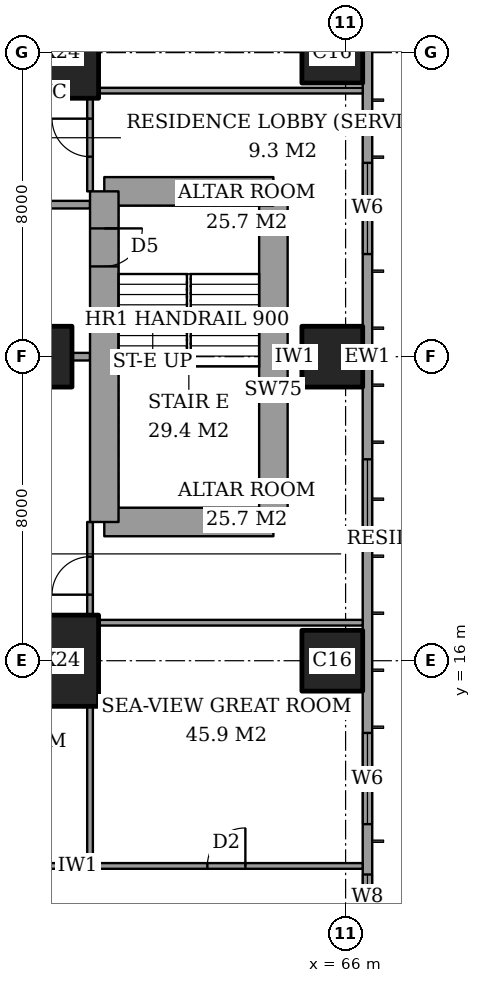
"""IFC4 building model, lengths in metres.
Left out: names, types, materials, properties, quantities, classifications, styles, units other than length and angle.
Written with IfcOpenShell. Run it as: python <this file> out.ifc"""

import sys

from ifc_helpers import new_model, si_unit, direction, frame, frame_2d, origin, origin_2d, place, context, subcontext, project, spatial, rectangle, extrude, element, fill, save


model = new_model("IFC4")
c1 = context("Model", 3, precision=1e-05, world=origin(), true_north=direction((0.0, 1.0)))
c2 = subcontext(c1, "Body", "Model", "MODEL_VIEW")
j1 = project(units=[si_unit("LENGTHUNIT", "METRE"), si_unit("PLANEANGLEUNIT", "RADIAN")], contexts=[c1])
p1 = place(None, origin())
s1 = spatial("IfcSite", under=j1, at=p1, CompositionType="ELEMENT")
p2 = place(p1, origin())
s2 = spatial("IfcBuilding", under=s1, at=p2, CompositionType="ELEMENT")
p3 = place(p2, frame((0.0, 0.0, 241.2)))
s3 = spatial("IfcBuildingStorey", under=s2, at=p3, CompositionType="ELEMENT", Elevation=241.2)
p4 = place(p3, frame((58.0, 16.0, 0.0), z_axis=(0.0, 0.0, 1.0), x_axis=(1.0, 0.0, 0.0)))
e1 = element("IfcColumn", 1, at=p4, inside=s3, PredefinedType="COLUMN", context=c2, shape_type="SweptSolid", body=[
    extrude(rectangle(XDim=3.0, YDim=2.4, at=origin_2d()), origin(), (0.0, 0.0, 1.0), 3.6),
])
p5 = place(p3, frame((58.0, 24.0, 0.0), z_axis=(0.0, 0.0, 1.0), x_axis=(1.0, 0.0, 0.0)))
e2 = element("IfcColumn", 2, at=p5, inside=s3, PredefinedType="COLUMN", context=c2, shape_type="SweptSolid", body=[
    extrude(rectangle(XDim=1.6, YDim=1.6, at=origin_2d()), origin(), (0.0, 0.0, 1.0), 3.6),
])
p6 = place(p3, frame((58.0, 32.0, 0.0), z_axis=(0.0, 0.0, 1.0), x_axis=(1.0, 0.0, 0.0)))
e3 = element("IfcColumn", 3, at=p6, inside=s3, PredefinedType="COLUMN", context=c2, shape_type="SweptSolid", body=[
    extrude(rectangle(XDim=3.0, YDim=2.4, at=origin_2d()), origin(), (0.0, 0.0, 1.0), 3.6),
])
for number, where, z_axis, x_axis in (
    (4, (65.65, 16.0, 0.0), (0.0, 0.0, 1.0), (1.0, 0.0, 0.0)),
    (5, (65.65, 24.0, 0.0), (0.0, 0.0, 1.0), (1.0, 0.0, 0.0)),
    (6, (65.65, 32.0, 0.0), (0.0, 0.0, 1.0), (1.0, 0.0, 0.0)),
):
    element("IfcColumn", number, at=place(p3, frame(where, z_axis=z_axis, x_axis=x_axis)), inside=s3, PredefinedType="COLUMN", context=c2, shape_type="SweptSolid", body=[
        extrude(rectangle(XDim=1.6, YDim=1.6, at=origin_2d()), origin(), (0.0, 0.0, 1.0), 3.6),
    ])
p7 = place(p3, frame((59.65, 19.65, 0.0), z_axis=(0.0, 0.0, 1.0), x_axis=(1.0, 0.0, 0.0)))
e7 = element("IfcWall", 7, at=p7, inside=s3, PredefinedType="SHEAR", context=c2, shape_type="SweptSolid", body=[
    extrude(rectangle(XDim=4.45, YDim=0.75, at=frame_2d((2.225, 0.0))), origin(), (0.0, 0.0, 1.0), 3.6),
])
p8 = place(p3, frame((64.1, 19.65, 0.0), z_axis=(0.0, 0.0, 1.0), x_axis=(0.0, 1.0, 0.0)))
e8 = element("IfcWall", 8, at=p8, inside=s3, PredefinedType="SHEAR", context=c2, shape_type="SweptSolid", body=[
    extrude(rectangle(XDim=8.7, YDim=0.75, at=frame_2d((4.35, 0.0))), origin(), (0.0, 0.0, 1.0), 3.6),
])
p9 = place(p3, frame((64.1, 28.35, 0.0), z_axis=(0.0, 0.0, 1.0), x_axis=(-1.0, 0.0, 0.0)))
e9 = element("IfcWall", 9, at=p9, inside=s3, PredefinedType="SHEAR", context=c2, shape_type="SweptSolid", body=[
    extrude(rectangle(XDim=4.45, YDim=0.75, at=frame_2d((2.225, 0.0))), origin(), (0.0, 0.0, 1.0), 3.6),
])
p10 = place(p3, frame((59.65, 28.35, 0.0), z_axis=(0.0, 0.0, 1.0), x_axis=(0.0, -1.0, 0.0)))
e10 = element("IfcWall", 10, at=p10, inside=s3, PredefinedType="SHEAR", context=c2, shape_type="SweptSolid", body=[
    extrude(rectangle(XDim=8.7, YDim=0.75, at=frame_2d((4.35, 0.0))), origin(), (0.0, 0.0, 1.0), 3.6),
])
p11 = place(p10, frame((0.975, 0.0, 0.0)))
e11 = element("IfcOpeningElement", 11, at=p11, cuts=e10, PredefinedType="OPENING", context=c2, shape_type="SweptSolid", body=[
    extrude(rectangle(XDim=1.0, YDim=2.1, at=frame_2d((0.5, 1.05))), frame((0.0, 0.385, 0.0), z_axis=(0.0, -1.0, 0.0), x_axis=(1.0, 0.0, 0.0)), (0.0, 0.0, 1.0), 0.77),
])
p12 = place(p3, frame((66.575, 3.175, 0.0), z_axis=(0.0, 0.0, 1.0), x_axis=(0.0, 1.0, 0.0)))
e12 = element("IfcWall", 12, at=p12, inside=s3, PredefinedType="SOLIDWALL", context=c2, shape_type="SweptSolid", body=[
    extrude(rectangle(XDim=41.65, YDim=0.25, at=frame_2d((20.825, 0.0))), origin(), (0.0, 0.0, 1.0), 3.6),
])
p13 = place(p12, frame((0.875, 0.0, 0.6)))
e13 = element("IfcOpeningElement", 13, at=p13, cuts=e12, PredefinedType="OPENING", context=c2, shape_type="SweptSolid", body=[
    extrude(rectangle(XDim=2.4, YDim=2.0, at=frame_2d((1.2, 1.0))), frame((0.0, 0.135, 0.0), z_axis=(0.0, -1.0, 0.0), x_axis=(1.0, 0.0, 0.0)), (0.0, 0.0, 1.0), 0.27),
])
p14 = place(p12, frame((6.0, 0.0, 0.6)))
e14 = element("IfcOpeningElement", 14, at=p14, cuts=e12, PredefinedType="OPENING", context=c2, shape_type="SweptSolid", body=[
    extrude(rectangle(XDim=1.2, YDim=2.0, at=frame_2d((0.6, 1.0))), frame((0.0, 0.135, 0.0), z_axis=(0.0, -1.0, 0.0), x_axis=(1.0, 0.0, 0.0)), (0.0, 0.0, 1.0), 0.27),
])
p15 = place(p12, frame((8.525, 0.0, 0.6)))
e15 = element("IfcOpeningElement", 15, at=p15, cuts=e12, PredefinedType="OPENING", context=c2, shape_type="SweptSolid", body=[
    extrude(rectangle(XDim=2.4, YDim=2.0, at=frame_2d((1.2, 1.0))), frame((0.0, 0.135, 0.0), z_axis=(0.0, -1.0, 0.0), x_axis=(1.0, 0.0, 0.0)), (0.0, 0.0, 1.0), 0.27),
])
p16 = place(p12, frame((15.725, 0.0, 0.6)))
e16 = element("IfcOpeningElement", 16, at=p16, cuts=e12, PredefinedType="OPENING", context=c2, shape_type="SweptSolid", body=[
    extrude(rectangle(XDim=2.4, YDim=2.0, at=frame_2d((1.2, 1.0))), frame((0.0, 0.135, 0.0), z_axis=(0.0, -1.0, 0.0), x_axis=(1.0, 0.0, 0.0)), (0.0, 0.0, 1.0), 0.27),
])
p17 = place(p12, frame((23.525, 0.0, 0.6)))
e17 = element("IfcOpeningElement", 17, at=p17, cuts=e12, PredefinedType="OPENING", context=c2, shape_type="SweptSolid", body=[
    extrude(rectangle(XDim=2.4, YDim=2.0, at=frame_2d((1.2, 1.0))), frame((0.0, 0.135, 0.0), z_axis=(0.0, -1.0, 0.0), x_axis=(1.0, 0.0, 0.0)), (0.0, 0.0, 1.0), 0.27),
])
p18 = place(p12, frame((30.625, 0.0, 0.6)))
e18 = element("IfcOpeningElement", 18, at=p18, cuts=e12, PredefinedType="OPENING", context=c2, shape_type="SweptSolid", body=[
    extrude(rectangle(XDim=2.4, YDim=2.0, at=frame_2d((1.2, 1.0))), frame((0.0, 0.135, 0.0), z_axis=(0.0, -1.0, 0.0), x_axis=(1.0, 0.0, 0.0)), (0.0, 0.0, 1.0), 0.27),
])
p19 = place(p12, frame((34.325, 0.0, 0.6)))
e19 = element("IfcOpeningElement", 19, at=p19, cuts=e12, PredefinedType="OPENING", context=c2, shape_type="SweptSolid", body=[
    extrude(rectangle(XDim=1.2, YDim=2.0, at=frame_2d((0.6, 1.0))), frame((0.0, 0.135, 0.0), z_axis=(0.0, -1.0, 0.0), x_axis=(1.0, 0.0, 0.0)), (0.0, 0.0, 1.0), 0.27),
])
p20 = place(p12, frame((38.375, 0.0, 0.6)))
e20 = element("IfcOpeningElement", 20, at=p20, cuts=e12, PredefinedType="OPENING", context=c2, shape_type="SweptSolid", body=[
    extrude(rectangle(XDim=2.4, YDim=2.0, at=frame_2d((1.2, 1.0))), frame((0.0, 0.135, 0.0), z_axis=(0.0, -1.0, 0.0), x_axis=(1.0, 0.0, 0.0)), (0.0, 0.0, 1.0), 0.27),
])
p21 = place(p3, frame((41.439, 10.6, 0.0), z_axis=(0.0, 0.0, 1.0), x_axis=(1.0, 0.0, 0.0)))
e21 = element("IfcWall", 21, at=p21, inside=s3, PredefinedType="PARTITIONING", context=c2, shape_type="SweptSolid", body=[
    extrude(rectangle(XDim=25.011, YDim=0.15, at=frame_2d((12.505, 0.0))), origin(), (0.0, 0.0, 1.0), 3.35),
])
p22 = place(p21, frame((11.961, 0.0, 0.0)))
e22 = element("IfcOpeningElement", 22, at=p22, cuts=e21, PredefinedType="OPENING", context=c2, shape_type="SweptSolid", body=[
    extrude(rectangle(XDim=1.0, YDim=2.1, at=frame_2d((0.5, 1.05))), frame((0.0, 0.085, 0.0), z_axis=(0.0, -1.0, 0.0), x_axis=(1.0, 0.0, 0.0)), (0.0, 0.0, 1.0), 0.17),
])
p23 = place(p21, frame((20.924, 0.0, 0.0)))
e23 = element("IfcOpeningElement", 23, at=p23, cuts=e21, PredefinedType="OPENING", context=c2, shape_type="SweptSolid", body=[
    extrude(rectangle(XDim=1.0, YDim=2.1, at=frame_2d((0.5, 1.05))), frame((0.0, 0.085, 0.0), z_axis=(0.0, -1.0, 0.0), x_axis=(1.0, 0.0, 0.0)), (0.0, 0.0, 1.0), 0.17),
])
p24 = place(p21, frame((15.249, 0.0, 0.0)))
e24 = element("IfcOpeningElement", 24, at=p24, cuts=e21, PredefinedType="OPENING", context=c2, shape_type="SweptSolid", body=[
    extrude(rectangle(XDim=0.9, YDim=2.1, at=frame_2d((0.45, 1.05))), frame((0.0, 0.085, 0.0), z_axis=(0.0, -1.0, 0.0), x_axis=(1.0, 0.0, 0.0)), (0.0, 0.0, 1.0), 0.17),
])
p25 = place(p21, frame((9.661, 0.0, 0.0)))
e25 = element("IfcOpeningElement", 25, at=p25, cuts=e21, PredefinedType="OPENING", context=c2, shape_type="SweptSolid", body=[
    extrude(rectangle(XDim=1.0, YDim=2.1, at=frame_2d((0.5, 1.05))), frame((0.0, 0.085, 0.0), z_axis=(0.0, -1.0, 0.0), x_axis=(1.0, 0.0, 0.0)), (0.0, 0.0, 1.0), 0.17),
])
p26 = place(p21, frame((7.311, 0.0, 0.0)))
e26 = element("IfcOpeningElement", 26, at=p26, cuts=e21, PredefinedType="OPENING", context=c2, shape_type="SweptSolid", body=[
    extrude(rectangle(XDim=0.9, YDim=2.1, at=frame_2d((0.45, 1.05))), frame((0.0, 0.085, 0.0), z_axis=(0.0, -1.0, 0.0), x_axis=(1.0, 0.0, 0.0)), (0.0, 0.0, 1.0), 0.17),
])
p27 = place(p21, frame((2.836, 0.0, 0.0)))
e27 = element("IfcOpeningElement", 27, at=p27, cuts=e21, PredefinedType="OPENING", context=c2, shape_type="SweptSolid", body=[
    extrude(rectangle(XDim=1.0, YDim=2.1, at=frame_2d((0.5, 1.05))), frame((0.0, 0.085, 0.0), z_axis=(0.0, -1.0, 0.0), x_axis=(1.0, 0.0, 0.0)), (0.0, 0.0, 1.0), 0.17),
])
p28 = place(p3, frame((59.5, 17.0, 0.0), z_axis=(0.0, 0.0, 1.0), x_axis=(1.0, 0.0, 0.0)))
e28 = element("IfcWall", 28, at=p28, inside=s3, PredefinedType="PARTITIONING", context=c2, shape_type="SweptSolid", body=[
    extrude(rectangle(XDim=6.95, YDim=0.15, at=frame_2d((3.475, 0.0))), origin(), (0.0, 0.0, 1.0), 3.35),
])
p29 = place(p3, frame((58.8, 24.0, 0.0), z_axis=(0.0, 0.0, 1.0), x_axis=(1.0, 0.0, 0.0)))
e29 = element("IfcWall", 29, at=p29, inside=s3, PredefinedType="PARTITIONING", context=c2, shape_type="SweptSolid", body=[
    extrude(rectangle(XDim=0.475, YDim=0.2, at=frame_2d((0.237, 0.0))), origin(), (0.0, 0.0, 1.0), 3.35),
])
p30 = place(p3, frame((64.475, 24.0, 0.0), z_axis=(0.0, 0.0, 1.0), x_axis=(1.0, 0.0, 0.0)))
e30 = element("IfcWall", 30, at=p30, inside=s3, PredefinedType="PARTITIONING", context=c2, shape_type="SweptSolid", body=[
    extrude(rectangle(XDim=0.375, YDim=0.15, at=frame_2d((0.188, 0.0))), origin(), (0.0, 0.0, 1.0), 3.35),
])
p31 = place(p3, frame((42.0, 28.0, 0.0), z_axis=(0.0, 0.0, 1.0), x_axis=(1.0, 0.0, 0.0)))
e31 = element("IfcWall", 31, at=p31, inside=s3, PredefinedType="PARTITIONING", context=c2, shape_type="SweptSolid", body=[
    extrude(rectangle(XDim=17.275, YDim=0.2, at=frame_2d((8.637, 0.0))), origin(), (0.0, 0.0, 1.0), 3.35),
])
p32 = place(p31, frame((9.4, 0.0, 0.0)))
e32 = element("IfcOpeningElement", 32, at=p32, cuts=e31, PredefinedType="OPENING", context=c2, shape_type="SweptSolid", body=[
    extrude(rectangle(XDim=1.2, YDim=2.4, at=frame_2d((0.6, 1.2))), frame((0.0, 0.11, 0.0), z_axis=(0.0, -1.0, 0.0), x_axis=(1.0, 0.0, 0.0)), (0.0, 0.0, 1.0), 0.22),
])
p33 = place(p3, frame((59.5, 31.0, 0.0), z_axis=(0.0, 0.0, 1.0), x_axis=(1.0, 0.0, 0.0)))
e33 = element("IfcWall", 33, at=p33, inside=s3, PredefinedType="PARTITIONING", context=c2, shape_type="SweptSolid", body=[
    extrude(rectangle(XDim=6.95, YDim=0.15, at=frame_2d((3.475, 0.0))), origin(), (0.0, 0.0, 1.0), 3.35),
])
p34 = place(p3, frame((59.275, 10.6, 0.0), z_axis=(0.0, 0.0, 1.0), x_axis=(0.0, 1.0, 0.0)))
e34 = element("IfcWall", 34, at=p34, inside=s3, PredefinedType="PARTITIONING", context=c2, shape_type="SweptSolid", body=[
    extrude(rectangle(XDim=4.2, YDim=0.15, at=frame_2d((2.1, 0.0))), origin(), (0.0, 0.0, 1.0), 3.35),
])
p35 = place(p3, frame((59.275, 17.2, 0.0), z_axis=(0.0, 0.0, 1.0), x_axis=(0.0, 1.0, 0.0)))
e35 = element("IfcWall", 35, at=p35, inside=s3, PredefinedType="PARTITIONING", context=c2, shape_type="SweptSolid", body=[
    extrude(rectangle(XDim=2.45, YDim=0.15, at=frame_2d((1.225, 0.0))), origin(), (0.0, 0.0, 1.0), 3.35),
])
p36 = place(p35, frame((0.538, 0.0, 0.0)))
e36 = element("IfcOpeningElement", 36, at=p36, cuts=e35, PredefinedType="OPENING", context=c2, shape_type="SweptSolid", body=[
    extrude(rectangle(XDim=1.0, YDim=2.1, at=frame_2d((0.5, 1.05))), frame((0.0, 0.085, 0.0), z_axis=(0.0, -1.0, 0.0), x_axis=(1.0, 0.0, 0.0)), (0.0, 0.0, 1.0), 0.17),
])
p37 = place(p3, frame((59.275, 28.35, 0.0), z_axis=(0.0, 0.0, 1.0), x_axis=(0.0, 1.0, 0.0)))
e37 = element("IfcWall", 37, at=p37, inside=s3, PredefinedType="PARTITIONING", context=c2, shape_type="SweptSolid", body=[
    extrude(rectangle(XDim=2.45, YDim=0.15, at=frame_2d((1.225, 0.0))), origin(), (0.0, 0.0, 1.0), 3.35),
])
p38 = place(p37, frame((0.913, 0.0, 0.0)))
e38 = element("IfcOpeningElement", 38, at=p38, cuts=e37, PredefinedType="OPENING", context=c2, shape_type="SweptSolid", body=[
    extrude(rectangle(XDim=1.0, YDim=2.1, at=frame_2d((0.5, 1.05))), frame((0.0, 0.085, 0.0), z_axis=(0.0, -1.0, 0.0), x_axis=(1.0, 0.0, 0.0)), (0.0, 0.0, 1.0), 0.17),
])
p39 = place(p14, origin())
e39 = element("IfcWindow", 39, at=p39, inside=s3, PartitioningType="SINGLE_PANEL", PredefinedType="WINDOW", context=c2, shape_type="SweptSolid", body=[
    extrude(rectangle(XDim=1.2, YDim=2.0, at=frame_2d((0.6, 1.0))), frame((0.0, 0.03, 0.0), z_axis=(0.0, -1.0, 0.0), x_axis=(1.0, 0.0, 0.0)), (0.0, 0.0, 1.0), 0.06),
])
fill(e14, e39)
p40 = place(p15, origin())
e40 = element("IfcWindow", 40, at=p40, inside=s3, PartitioningType="SINGLE_PANEL", PredefinedType="WINDOW", context=c2, shape_type="SweptSolid", body=[
    extrude(rectangle(XDim=2.4, YDim=2.0, at=frame_2d((1.2, 1.0))), frame((0.0, 0.03, 0.0), z_axis=(0.0, -1.0, 0.0), x_axis=(1.0, 0.0, 0.0)), (0.0, 0.0, 1.0), 0.06),
])
fill(e15, e40)
p41 = place(p16, origin())
e41 = element("IfcWindow", 41, at=p41, inside=s3, PartitioningType="SINGLE_PANEL", PredefinedType="WINDOW", context=c2, shape_type="SweptSolid", body=[
    extrude(rectangle(XDim=2.4, YDim=2.0, at=frame_2d((1.2, 1.0))), frame((0.0, 0.03, 0.0), z_axis=(0.0, -1.0, 0.0), x_axis=(1.0, 0.0, 0.0)), (0.0, 0.0, 1.0), 0.06),
])
fill(e16, e41)
p42 = place(p17, origin())
e42 = element("IfcWindow", 42, at=p42, inside=s3, PartitioningType="SINGLE_PANEL", PredefinedType="WINDOW", context=c2, shape_type="SweptSolid", body=[
    extrude(rectangle(XDim=2.4, YDim=2.0, at=frame_2d((1.2, 1.0))), frame((0.0, 0.03, 0.0), z_axis=(0.0, -1.0, 0.0), x_axis=(1.0, 0.0, 0.0)), (0.0, 0.0, 1.0), 0.06),
])
fill(e17, e42)
p43 = place(p23, origin())
e43 = element("IfcDoor", 43, at=p43, inside=s3, OperationType="SINGLE_SWING_LEFT", PredefinedType="DOOR", context=c2, shape_type="SweptSolid", body=[
    extrude(rectangle(XDim=1.0, YDim=2.1, at=frame_2d((0.5, 1.05))), frame((0.0, 0.025, 0.0), z_axis=(0.0, -1.0, 0.0), x_axis=(1.0, 0.0, 0.0)), (0.0, 0.0, 1.0), 0.05),
])
fill(e23, e43)
p44 = place(p36, origin())
e44 = element("IfcDoor", 44, at=p44, inside=s3, OperationType="SINGLE_SWING_RIGHT", PredefinedType="DOOR", context=c2, shape_type="SweptSolid", body=[
    extrude(rectangle(XDim=1.0, YDim=2.1, at=frame_2d((0.5, 1.05))), frame((0.0, 0.025, 0.0), z_axis=(0.0, -1.0, 0.0), x_axis=(1.0, 0.0, 0.0)), (0.0, 0.0, 1.0), 0.05),
])
fill(e36, e44)
p45 = place(p38, origin())
e45 = element("IfcDoor", 45, at=p45, inside=s3, OperationType="SINGLE_SWING_LEFT", PredefinedType="DOOR", context=c2, shape_type="SweptSolid", body=[
    extrude(rectangle(XDim=1.0, YDim=2.1, at=frame_2d((0.5, 1.05))), frame((0.0, 0.025, 0.0), z_axis=(0.0, -1.0, 0.0), x_axis=(1.0, 0.0, 0.0)), (0.0, 0.0, 1.0), 0.05),
])
fill(e38, e45)
p46 = place(p11, origin())
e46 = element("IfcDoor", 46, at=p46, inside=s3, OperationType="SINGLE_SWING_RIGHT", PredefinedType="DOOR", context=c2, shape_type="SweptSolid", body=[
    extrude(rectangle(XDim=1.0, YDim=2.1, at=frame_2d((0.5, 1.05))), frame((0.0, 0.025, 0.0), z_axis=(0.0, -1.0, 0.0), x_axis=(1.0, 0.0, 0.0)), (0.0, 0.0, 1.0), 0.05),
])
fill(e11, e46)
save(model, sys.argv[1])
